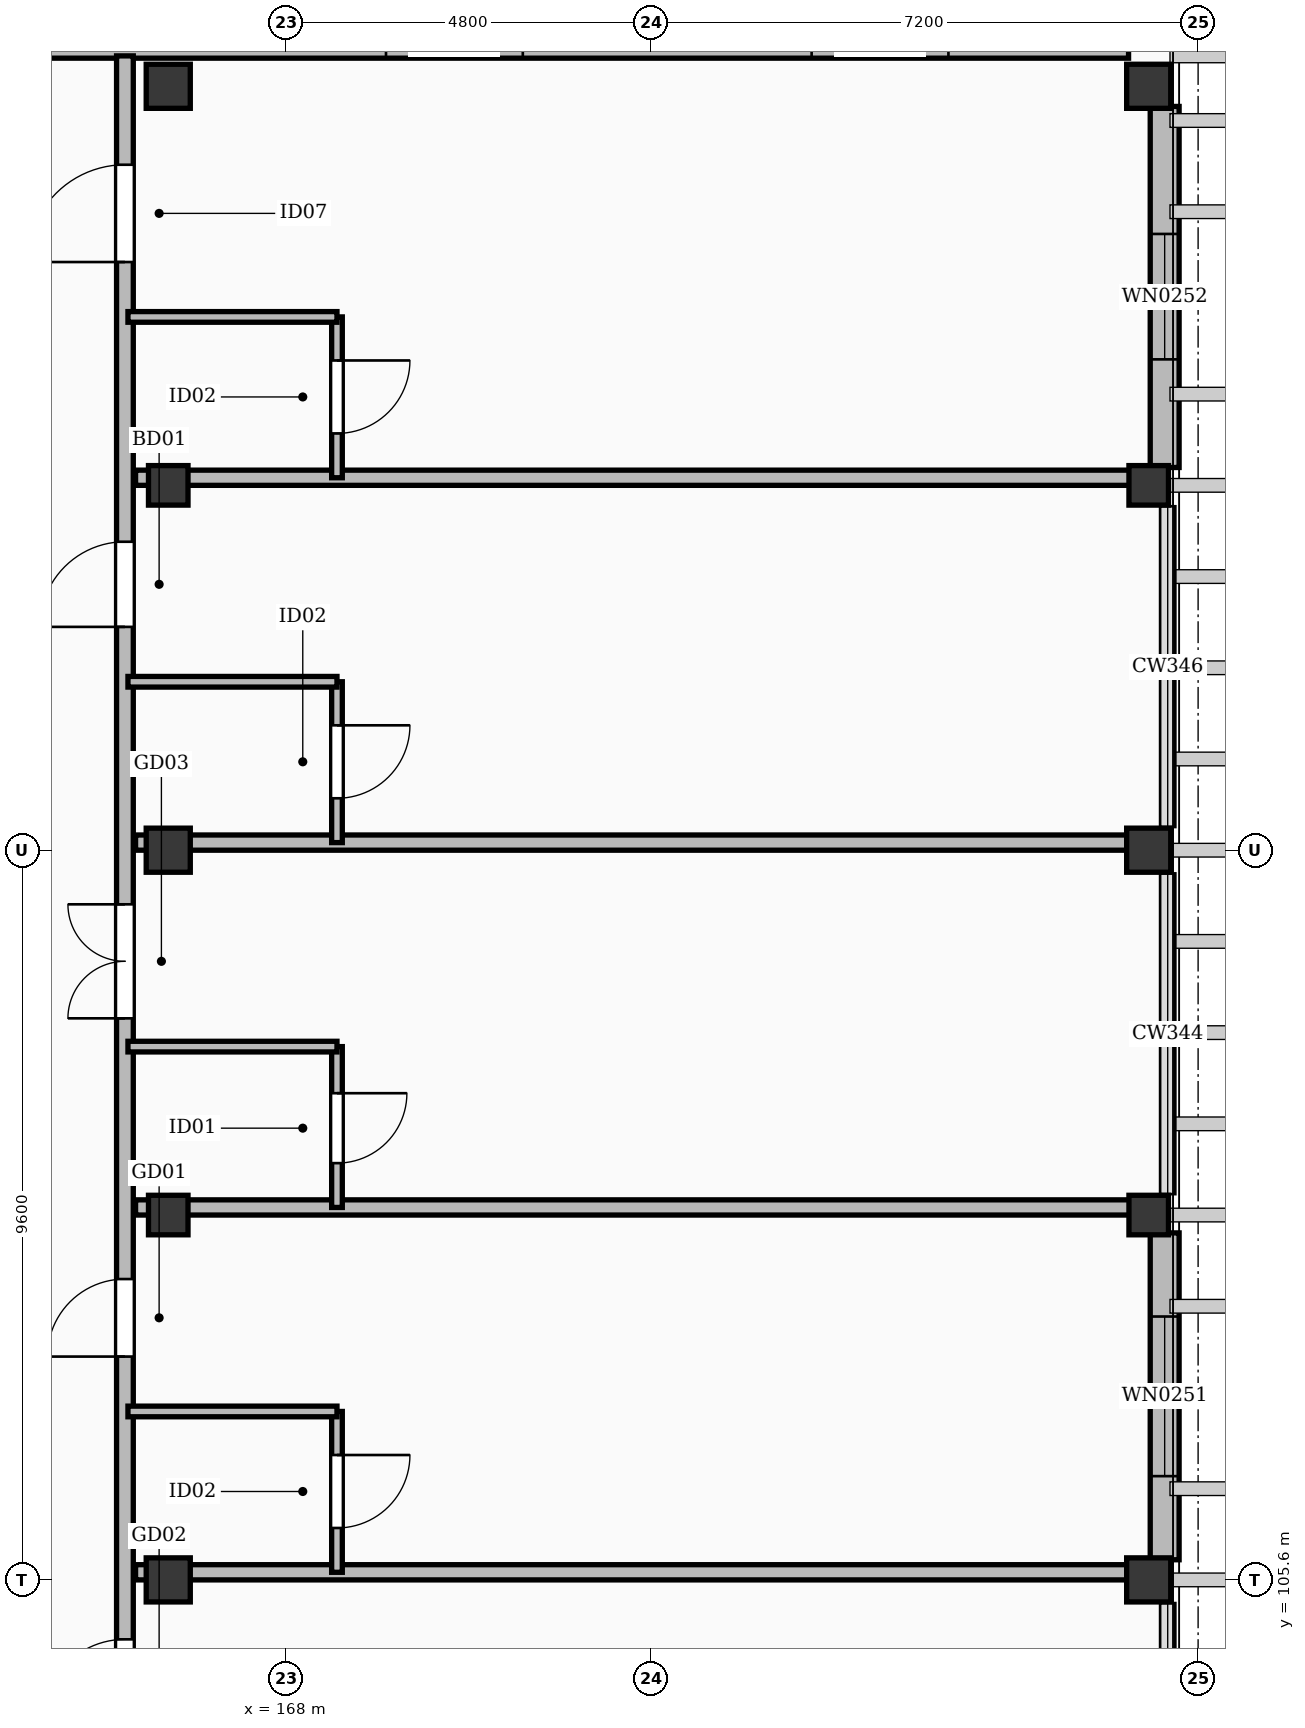
"""IFC4 building model, lengths in metres.
Left out: names, types, materials, properties, quantities, classifications, styles, units other than length and angle.
Written with IfcOpenShell. Run it as: python <this file> out.ifc"""

import sys

from ifc_helpers import new_model, si_unit, direction, frame, frame_2d, origin, origin_2d, place, context, subcontext, project, spatial, rectangle, extrude, element, fill, save


model = new_model("IFC4")
c1 = context("Model", 3, precision=1e-05, world=origin(), true_north=direction((0.0, 1.0)))
c2 = subcontext(c1, "Body", "Model", "MODEL_VIEW")
j1 = project(units=[si_unit("LENGTHUNIT", "METRE"), si_unit("PLANEANGLEUNIT", "RADIAN")], contexts=[c1])
p1 = place(None, origin())
s1 = spatial("IfcSite", under=j1, at=p1, CompositionType="ELEMENT")
p2 = place(p1, origin())
s2 = spatial("IfcBuilding", under=s1, at=p2, CompositionType="ELEMENT")
p3 = place(p2, frame((0.0, 0.0, 46.5)))
s3 = spatial("IfcBuildingStorey", under=s2, at=p3, CompositionType="ELEMENT", Elevation=46.5)
for number, where, z_axis, x_axis in (
    (1, (166.45, 105.6, 0.0), (0.0, 0.0, 1.0), (1.0, 0.0, 0.0)),
    (2, (166.45, 115.2, 0.0), (0.0, 0.0, 1.0), (1.0, 0.0, 0.0)),
    (3, (166.45, 125.25, 0.0), (0.0, 0.0, 1.0), (1.0, 0.0, 0.0)),
    (4, (179.35, 105.6, 0.0), (0.0, 0.0, 1.0), (1.0, 0.0, 0.0)),
    (5, (179.35, 115.2, 0.0), (0.0, 0.0, 1.0), (1.0, 0.0, 0.0)),
    (6, (179.35, 125.25, 0.0), (0.0, 0.0, 1.0), (1.0, 0.0, 0.0)),
):
    element("IfcColumn", number, at=place(p3, frame(where, z_axis=z_axis, x_axis=x_axis)), inside=s3, PredefinedType="COLUMN", context=c2, shape_type="SweptSolid", body=[
        extrude(rectangle(XDim=0.58, YDim=0.58, at=origin_2d()), origin(), (0.0, 0.0, 1.0), 3.9),
    ])
for number, where, z_axis, x_axis in (
    (7, (166.45, 110.4, 0.0), (0.0, 0.0, 1.0), (1.0, 0.0, 0.0)),
    (8, (166.45, 120.0, 0.0), (0.0, 0.0, 1.0), (1.0, 0.0, 0.0)),
    (9, (179.35, 110.4, 0.0), (0.0, 0.0, 1.0), (1.0, 0.0, 0.0)),
    (10, (179.35, 120.0, 0.0), (0.0, 0.0, 1.0), (1.0, 0.0, 0.0)),
):
    element("IfcColumn", number, at=place(p3, frame(where, z_axis=z_axis, x_axis=x_axis)), inside=s3, PredefinedType="COLUMN", context=c2, shape_type="SweptSolid", body=[
        extrude(rectangle(XDim=0.52, YDim=0.52, at=origin_2d()), origin(), (0.0, 0.0, 1.0), 3.9),
    ])
p4 = place(p3, frame((149.715, 125.81, 0.0), z_axis=(0.0, 0.0, 1.0), x_axis=(1.0, 0.0, 0.0)))
e11 = element("IfcWall", 11, at=p4, inside=s3, PredefinedType="SOLIDWALL", context=c2, shape_type="SweptSolid", body=[
    extrude(rectangle(XDim=29.37, YDim=0.38, at=frame_2d((14.685, 0.0))), origin(), (0.0, 0.0, 1.0), 3.68),
])
p5 = place(p4, frame((3.6, 0.0, 0.55)))
e12 = element("IfcOpeningElement", 12, at=p5, cuts=e11, PredefinedType="OPENING", context=c2, shape_type="SweptSolid", body=[
    extrude(rectangle(XDim=1.8, YDim=1.76, at=frame_2d((0.9, 0.88))), frame((0.0, 0.202, 0.0), z_axis=(0.0, -1.0, 0.0), x_axis=(1.0, 0.0, 0.0)), (0.0, 0.0, 1.0), 0.404),
])
p6 = place(p4, frame((9.2, 0.0, 0.55)))
e13 = element("IfcOpeningElement", 13, at=p6, cuts=e11, PredefinedType="OPENING", context=c2, shape_type="SweptSolid", body=[
    extrude(rectangle(XDim=1.8, YDim=1.76, at=frame_2d((0.9, 0.88))), frame((0.0, 0.202, 0.0), z_axis=(0.0, -1.0, 0.0), x_axis=(1.0, 0.0, 0.0)), (0.0, 0.0, 1.0), 0.404),
])
p7 = place(p4, frame((19.6, 0.0, 0.55)))
e14 = element("IfcOpeningElement", 14, at=p7, cuts=e11, PredefinedType="OPENING", context=c2, shape_type="SweptSolid", body=[
    extrude(rectangle(XDim=1.8, YDim=1.76, at=frame_2d((0.9, 0.88))), frame((0.0, 0.202, 0.0), z_axis=(0.0, -1.0, 0.0), x_axis=(1.0, 0.0, 0.0)), (0.0, 0.0, 1.0), 0.404),
])
p8 = place(p4, frame((25.2, 0.0, 0.55)))
e15 = element("IfcOpeningElement", 15, at=p8, cuts=e11, PredefinedType="OPENING", context=c2, shape_type="SweptSolid", body=[
    extrude(rectangle(XDim=1.8, YDim=1.76, at=frame_2d((0.9, 0.88))), frame((0.0, 0.202, 0.0), z_axis=(0.0, -1.0, 0.0), x_axis=(1.0, 0.0, 0.0)), (0.0, 0.0, 1.0), 0.404),
])
p9 = place(p3, frame((179.56, 110.165, 0.0), z_axis=(0.0, 0.0, 1.0), x_axis=(0.0, -1.0, 0.0)))
e16 = element("IfcWall", 16, at=p9, inside=s3, PredefinedType="SOLIDWALL", context=c2, shape_type="SweptSolid", body=[
    extrude(rectangle(XDim=4.3, YDim=0.38, at=frame_2d((2.15, 0.0))), origin(), (0.0, 0.0, 1.0), 3.072),
])
p10 = place(p9, frame((1.1, 0.0, 0.55)))
e17 = element("IfcOpeningElement", 17, at=p10, cuts=e16, PredefinedType="OPENING", context=c2, shape_type="SweptSolid", body=[
    extrude(rectangle(XDim=2.1, YDim=1.78, at=frame_2d((1.05, 0.89))), frame((0.0, 0.202, 0.0), z_axis=(0.0, -1.0, 0.0), x_axis=(1.0, 0.0, 0.0)), (0.0, 0.0, 1.0), 0.404),
])
p11 = place(p3, frame((179.56, 124.985, 0.0), z_axis=(0.0, 0.0, 1.0), x_axis=(0.0, -1.0, 0.0)))
e18 = element("IfcWall", 18, at=p11, inside=s3, PredefinedType="SOLIDWALL", context=c2, shape_type="SweptSolid", body=[
    extrude(rectangle(XDim=4.75, YDim=0.38, at=frame_2d((2.375, 0.0))), origin(), (0.0, 0.0, 1.0), 2.922),
])
p12 = place(p11, frame((1.677, 0.0, 0.55)))
e19 = element("IfcOpeningElement", 19, at=p12, cuts=e18, PredefinedType="OPENING", context=c2, shape_type="SweptSolid", body=[
    extrude(rectangle(XDim=1.65, YDim=1.75, at=frame_2d((0.825, 0.875))), frame((0.0, 0.202, 0.0), z_axis=(0.0, -1.0, 0.0), x_axis=(1.0, 0.0, 0.0)), (0.0, 0.0, 1.0), 0.404),
])
p13 = place(p3, frame((165.88, 67.55, 0.0), z_axis=(0.0, 0.0, 1.0), x_axis=(0.0, 1.0, 0.0)))
e20 = element("IfcWall", 20, at=p13, inside=s3, PredefinedType="PARTITIONING", context=c2, shape_type="SweptSolid", body=[
    extrude(rectangle(XDim=58.1, YDim=0.22, at=frame_2d((29.05, 0.0))), origin(), (0.0, 0.0, 1.0), 2.922),
])
p14 = place(p13, frame((5.15, 0.0, 0.0)))
e21 = element("IfcOpeningElement", 21, at=p14, cuts=e20, PredefinedType="OPENING", context=c2, shape_type="SweptSolid", body=[
    extrude(rectangle(XDim=1.28, YDim=2.16, at=frame_2d((0.64, 1.08))), frame((0.0, 0.122, 0.0), z_axis=(0.0, -1.0, 0.0), x_axis=(1.0, 0.0, 0.0)), (0.0, 0.0, 1.0), 0.244),
])
p15 = place(p13, frame((12.188, 0.0, 0.0)))
e22 = element("IfcOpeningElement", 22, at=p15, cuts=e20, PredefinedType="OPENING", context=c2, shape_type="SweptSolid", body=[
    extrude(rectangle(XDim=1.02, YDim=2.2, at=frame_2d((0.51, 1.1))), frame((0.0, 0.122, 0.0), z_axis=(0.0, -1.0, 0.0), x_axis=(1.0, 0.0, 0.0)), (0.0, 0.0, 1.0), 0.244),
])
p16 = place(p13, frame((16.638, 0.0, 0.0)))
e23 = element("IfcOpeningElement", 23, at=p16, cuts=e20, PredefinedType="OPENING", context=c2, shape_type="SweptSolid", body=[
    extrude(rectangle(XDim=1.5, YDim=2.3, at=frame_2d((0.75, 1.15))), frame((0.0, 0.122, 0.0), z_axis=(0.0, -1.0, 0.0), x_axis=(1.0, 0.0, 0.0)), (0.0, 0.0, 1.0), 0.244),
])
p17 = place(p13, frame((21.788, 0.0, 0.0)))
e24 = element("IfcOpeningElement", 24, at=p17, cuts=e20, PredefinedType="OPENING", context=c2, shape_type="SweptSolid", body=[
    extrude(rectangle(XDim=1.12, YDim=2.15, at=frame_2d((0.56, 1.075))), frame((0.0, 0.122, 0.0), z_axis=(0.0, -1.0, 0.0), x_axis=(1.0, 0.0, 0.0)), (0.0, 0.0, 1.0), 0.244),
])
p18 = place(p13, frame((26.588, 0.0, 0.0)))
e25 = element("IfcOpeningElement", 25, at=p18, cuts=e20, PredefinedType="OPENING", context=c2, shape_type="SweptSolid", body=[
    extrude(rectangle(XDim=1.28, YDim=2.16, at=frame_2d((0.64, 1.08))), frame((0.0, 0.122, 0.0), z_axis=(0.0, -1.0, 0.0), x_axis=(1.0, 0.0, 0.0)), (0.0, 0.0, 1.0), 0.244),
])
p19 = place(p13, frame((31.388, 0.0, 0.0)))
e26 = element("IfcOpeningElement", 26, at=p19, cuts=e20, PredefinedType="OPENING", context=c2, shape_type="SweptSolid", body=[
    extrude(rectangle(XDim=1.05, YDim=2.18, at=frame_2d((0.525, 1.09))), frame((0.0, 0.122, 0.0), z_axis=(0.0, -1.0, 0.0), x_axis=(1.0, 0.0, 0.0)), (0.0, 0.0, 1.0), 0.244),
])
p20 = place(p13, frame((36.188, 0.0, 0.0)))
e27 = element("IfcOpeningElement", 27, at=p20, cuts=e20, PredefinedType="OPENING", context=c2, shape_type="SweptSolid", body=[
    extrude(rectangle(XDim=1.08, YDim=2.25, at=frame_2d((0.54, 1.125))), frame((0.0, 0.122, 0.0), z_axis=(0.0, -1.0, 0.0), x_axis=(1.0, 0.0, 0.0)), (0.0, 0.0, 1.0), 0.244),
])
p21 = place(p13, frame((40.988, 0.0, 0.0)))
e28 = element("IfcOpeningElement", 28, at=p21, cuts=e20, PredefinedType="OPENING", context=c2, shape_type="SweptSolid", body=[
    extrude(rectangle(XDim=1.02, YDim=2.2, at=frame_2d((0.51, 1.1))), frame((0.0, 0.122, 0.0), z_axis=(0.0, -1.0, 0.0), x_axis=(1.0, 0.0, 0.0)), (0.0, 0.0, 1.0), 0.244),
])
p22 = place(p13, frame((45.438, 0.0, 0.0)))
e29 = element("IfcOpeningElement", 29, at=p22, cuts=e20, PredefinedType="OPENING", context=c2, shape_type="SweptSolid", body=[
    extrude(rectangle(XDim=1.5, YDim=2.3, at=frame_2d((0.75, 1.15))), frame((0.0, 0.122, 0.0), z_axis=(0.0, -1.0, 0.0), x_axis=(1.0, 0.0, 0.0)), (0.0, 0.0, 1.0), 0.244),
])
p23 = place(p13, frame((50.588, 0.0, 0.0)))
e30 = element("IfcOpeningElement", 30, at=p23, cuts=e20, PredefinedType="OPENING", context=c2, shape_type="SweptSolid", body=[
    extrude(rectangle(XDim=1.12, YDim=2.15, at=frame_2d((0.56, 1.075))), frame((0.0, 0.122, 0.0), z_axis=(0.0, -1.0, 0.0), x_axis=(1.0, 0.0, 0.0)), (0.0, 0.0, 1.0), 0.244),
])
p24 = place(p13, frame((55.388, 0.0, 0.0)))
e31 = element("IfcOpeningElement", 31, at=p24, cuts=e20, PredefinedType="OPENING", context=c2, shape_type="SweptSolid", body=[
    extrude(rectangle(XDim=1.28, YDim=2.16, at=frame_2d((0.64, 1.08))), frame((0.0, 0.122, 0.0), z_axis=(0.0, -1.0, 0.0), x_axis=(1.0, 0.0, 0.0)), (0.0, 0.0, 1.0), 0.244),
])
p25 = place(p3, frame((166.02, 105.7, 0.0), z_axis=(0.0, 0.0, 1.0), x_axis=(1.0, 0.0, 0.0)))
e32 = element("IfcWall", 32, at=p25, inside=s3, PredefinedType="PARTITIONING", context=c2, shape_type="SweptSolid", body=[
    extrude(rectangle(XDim=13.23, YDim=0.2, at=frame_2d((6.615, 0.0))), origin(), (0.0, 0.0, 1.0), 3.072),
])
p26 = place(p3, frame((168.67, 105.7, 0.0), z_axis=(0.0, 0.0, 1.0), x_axis=(0.0, 1.0, 0.0)))
e33 = element("IfcWall", 33, at=p26, inside=s3, PredefinedType="PARTITIONING", context=c2, shape_type="SweptSolid", body=[
    extrude(rectangle(XDim=2.116, YDim=0.14, at=frame_2d((1.058, 0.0))), origin(), (0.0, 0.0, 1.0), 3.072),
])
p27 = place(p26, frame((0.583, 0.0, 0.0)))
e34 = element("IfcOpeningElement", 34, at=p27, cuts=e33, PredefinedType="OPENING", context=c2, shape_type="SweptSolid", body=[
    extrude(rectangle(XDim=0.96, YDim=2.12, at=frame_2d((0.48, 1.06))), frame((0.0, 0.082, 0.0), z_axis=(0.0, -1.0, 0.0), x_axis=(1.0, 0.0, 0.0)), (0.0, 0.0, 1.0), 0.164),
])
p28 = place(p3, frame((165.92, 107.816, 0.0), z_axis=(0.0, 0.0, 1.0), x_axis=(1.0, 0.0, 0.0)))
e35 = element("IfcWall", 35, at=p28, inside=s3, PredefinedType="PARTITIONING", context=c2, shape_type="SweptSolid", body=[
    extrude(rectangle(XDim=2.75, YDim=0.14, at=frame_2d((1.375, 0.0))), origin(), (0.0, 0.0, 1.0), 3.072),
])
p29 = place(p3, frame((166.02, 110.5, 0.0), z_axis=(0.0, 0.0, 1.0), x_axis=(1.0, 0.0, 0.0)))
e36 = element("IfcWall", 36, at=p29, inside=s3, PredefinedType="PARTITIONING", context=c2, shape_type="SweptSolid", body=[
    extrude(rectangle(XDim=13.23, YDim=0.2, at=frame_2d((6.615, 0.0))), origin(), (0.0, 0.0, 1.0), 3.072),
])
p30 = place(p3, frame((168.67, 110.5, 0.0), z_axis=(0.0, 0.0, 1.0), x_axis=(0.0, 1.0, 0.0)))
e37 = element("IfcWall", 37, at=p30, inside=s3, PredefinedType="PARTITIONING", context=c2, shape_type="SweptSolid", body=[
    extrude(rectangle(XDim=2.116, YDim=0.14, at=frame_2d((1.058, 0.0))), origin(), (0.0, 0.0, 1.0), 3.072),
])
p31 = place(p30, frame((0.583, 0.0, 0.0)))
e38 = element("IfcOpeningElement", 38, at=p31, cuts=e37, PredefinedType="OPENING", context=c2, shape_type="SweptSolid", body=[
    extrude(rectangle(XDim=0.92, YDim=2.1, at=frame_2d((0.46, 1.05))), frame((0.0, 0.082, 0.0), z_axis=(0.0, -1.0, 0.0), x_axis=(1.0, 0.0, 0.0)), (0.0, 0.0, 1.0), 0.164),
])
p32 = place(p3, frame((165.92, 112.616, 0.0), z_axis=(0.0, 0.0, 1.0), x_axis=(1.0, 0.0, 0.0)))
e39 = element("IfcWall", 39, at=p32, inside=s3, PredefinedType="PARTITIONING", context=c2, shape_type="SweptSolid", body=[
    extrude(rectangle(XDim=2.75, YDim=0.14, at=frame_2d((1.375, 0.0))), origin(), (0.0, 0.0, 1.0), 3.072),
])
p33 = place(p3, frame((166.02, 115.3, 0.0), z_axis=(0.0, 0.0, 1.0), x_axis=(1.0, 0.0, 0.0)))
e40 = element("IfcWall", 40, at=p33, inside=s3, PredefinedType="PARTITIONING", context=c2, shape_type="SweptSolid", body=[
    extrude(rectangle(XDim=13.23, YDim=0.2, at=frame_2d((6.615, 0.0))), origin(), (0.0, 0.0, 1.0), 3.072),
])
p34 = place(p3, frame((168.67, 115.3, 0.0), z_axis=(0.0, 0.0, 1.0), x_axis=(0.0, 1.0, 0.0)))
e41 = element("IfcWall", 41, at=p34, inside=s3, PredefinedType="PARTITIONING", context=c2, shape_type="SweptSolid", body=[
    extrude(rectangle(XDim=2.116, YDim=0.14, at=frame_2d((1.058, 0.0))), origin(), (0.0, 0.0, 1.0), 3.072),
])
p35 = place(p34, frame((0.583, 0.0, 0.0)))
e42 = element("IfcOpeningElement", 42, at=p35, cuts=e41, PredefinedType="OPENING", context=c2, shape_type="SweptSolid", body=[
    extrude(rectangle(XDim=0.96, YDim=2.12, at=frame_2d((0.48, 1.06))), frame((0.0, 0.082, 0.0), z_axis=(0.0, -1.0, 0.0), x_axis=(1.0, 0.0, 0.0)), (0.0, 0.0, 1.0), 0.164),
])
p36 = place(p3, frame((165.92, 117.416, 0.0), z_axis=(0.0, 0.0, 1.0), x_axis=(1.0, 0.0, 0.0)))
e43 = element("IfcWall", 43, at=p36, inside=s3, PredefinedType="PARTITIONING", context=c2, shape_type="SweptSolid", body=[
    extrude(rectangle(XDim=2.75, YDim=0.14, at=frame_2d((1.375, 0.0))), origin(), (0.0, 0.0, 1.0), 3.072),
])
p37 = place(p3, frame((166.02, 120.1, 0.0), z_axis=(0.0, 0.0, 1.0), x_axis=(1.0, 0.0, 0.0)))
e44 = element("IfcWall", 44, at=p37, inside=s3, PredefinedType="PARTITIONING", context=c2, shape_type="SweptSolid", body=[
    extrude(rectangle(XDim=13.23, YDim=0.2, at=frame_2d((6.615, 0.0))), origin(), (0.0, 0.0, 1.0), 3.072),
])
p38 = place(p3, frame((168.67, 120.1, 0.0), z_axis=(0.0, 0.0, 1.0), x_axis=(0.0, 1.0, 0.0)))
e45 = element("IfcWall", 45, at=p38, inside=s3, PredefinedType="PARTITIONING", context=c2, shape_type="SweptSolid", body=[
    extrude(rectangle(XDim=2.116, YDim=0.14, at=frame_2d((1.058, 0.0))), origin(), (0.0, 0.0, 1.0), 3.072),
])
p39 = place(p38, frame((0.583, 0.0, 0.0)))
e46 = element("IfcOpeningElement", 46, at=p39, cuts=e45, PredefinedType="OPENING", context=c2, shape_type="SweptSolid", body=[
    extrude(rectangle(XDim=0.96, YDim=2.12, at=frame_2d((0.48, 1.06))), frame((0.0, 0.082, 0.0), z_axis=(0.0, -1.0, 0.0), x_axis=(1.0, 0.0, 0.0)), (0.0, 0.0, 1.0), 0.164),
])
p40 = place(p3, frame((165.92, 122.216, 0.0), z_axis=(0.0, 0.0, 1.0), x_axis=(1.0, 0.0, 0.0)))
e47 = element("IfcWall", 47, at=p40, inside=s3, PredefinedType="PARTITIONING", context=c2, shape_type="SweptSolid", body=[
    extrude(rectangle(XDim=2.75, YDim=0.14, at=frame_2d((1.375, 0.0))), origin(), (0.0, 0.0, 1.0), 3.072),
])
p41 = place(p10, origin())
e48 = element("IfcWindow", 48, at=p41, inside=s3, PartitioningType="SINGLE_PANEL", PredefinedType="WINDOW", context=c2, shape_type="SweptSolid", body=[
    extrude(rectangle(XDim=2.1, YDim=1.78, at=frame_2d((1.05, 0.89))), frame((0.0, 0.03, 0.0), z_axis=(0.0, -1.0, 0.0), x_axis=(1.0, 0.0, 0.0)), (0.0, 0.0, 1.0), 0.06),
])
fill(e17, e48)
p42 = place(p12, origin())
e49 = element("IfcWindow", 49, at=p42, inside=s3, PartitioningType="SINGLE_PANEL", PredefinedType="WINDOW", context=c2, shape_type="SweptSolid", body=[
    extrude(rectangle(XDim=1.65, YDim=1.75, at=frame_2d((0.825, 0.875))), frame((0.0, 0.03, 0.0), z_axis=(0.0, -1.0, 0.0), x_axis=(1.0, 0.0, 0.0)), (0.0, 0.0, 1.0), 0.06),
])
fill(e19, e49)
p43 = place(p20, origin())
e50 = element("IfcDoor", 50, at=p43, inside=s3, OperationType="SINGLE_SWING_LEFT", PredefinedType="DOOR", context=c2, shape_type="SweptSolid", body=[
    extrude(rectangle(XDim=1.08, YDim=2.25, at=frame_2d((0.54, 1.125))), frame((0.0, 0.025, 0.0), z_axis=(0.0, -1.0, 0.0), x_axis=(1.0, 0.0, 0.0)), (0.0, 0.0, 1.0), 0.05),
])
fill(e27, e50)
p44 = place(p21, origin())
e51 = element("IfcDoor", 51, at=p44, inside=s3, OperationType="SINGLE_SWING_LEFT", PredefinedType="DOOR", context=c2, shape_type="SweptSolid", body=[
    extrude(rectangle(XDim=1.02, YDim=2.2, at=frame_2d((0.51, 1.1))), frame((0.0, 0.025, 0.0), z_axis=(0.0, -1.0, 0.0), x_axis=(1.0, 0.0, 0.0)), (0.0, 0.0, 1.0), 0.05),
])
fill(e28, e51)
p45 = place(p27, frame((0.96, 0.0, 0.0), z_axis=(0.0, 0.0, 1.0), x_axis=(-1.0, 0.0, 0.0)))
e52 = element("IfcDoor", 52, at=p45, inside=s3, OperationType="SINGLE_SWING_RIGHT", PredefinedType="DOOR", context=c2, shape_type="SweptSolid", body=[
    extrude(rectangle(XDim=0.96, YDim=2.12, at=frame_2d((0.48, 1.06))), frame((0.0, 0.025, 0.0), z_axis=(0.0, -1.0, 0.0), x_axis=(1.0, 0.0, 0.0)), (0.0, 0.0, 1.0), 0.05),
])
fill(e34, e52)
p46 = place(p22, origin())
e53 = element("IfcDoor", 53, at=p46, inside=s3, OperationType="DOUBLE_DOOR_SINGLE_SWING", PredefinedType="DOOR", context=c2, shape_type="SweptSolid", body=[
    extrude(rectangle(XDim=1.5, YDim=2.3, at=frame_2d((0.75, 1.15))), frame((0.0, 0.025, 0.0), z_axis=(0.0, -1.0, 0.0), x_axis=(1.0, 0.0, 0.0)), (0.0, 0.0, 1.0), 0.05),
])
fill(e29, e53)
p47 = place(p31, frame((0.92, 0.0, 0.0), z_axis=(0.0, 0.0, 1.0), x_axis=(-1.0, 0.0, 0.0)))
e54 = element("IfcDoor", 54, at=p47, inside=s3, OperationType="SINGLE_SWING_RIGHT", PredefinedType="DOOR", context=c2, shape_type="SweptSolid", body=[
    extrude(rectangle(XDim=0.92, YDim=2.1, at=frame_2d((0.46, 1.05))), frame((0.0, 0.025, 0.0), z_axis=(0.0, -1.0, 0.0), x_axis=(1.0, 0.0, 0.0)), (0.0, 0.0, 1.0), 0.05),
])
fill(e38, e54)
p48 = place(p23, origin())
e55 = element("IfcDoor", 55, at=p48, inside=s3, OperationType="SINGLE_SWING_LEFT", PredefinedType="DOOR", context=c2, shape_type="SweptSolid", body=[
    extrude(rectangle(XDim=1.12, YDim=2.15, at=frame_2d((0.56, 1.075))), frame((0.0, 0.025, 0.0), z_axis=(0.0, -1.0, 0.0), x_axis=(1.0, 0.0, 0.0)), (0.0, 0.0, 1.0), 0.05),
])
fill(e30, e55)
p49 = place(p35, frame((0.96, 0.0, 0.0), z_axis=(0.0, 0.0, 1.0), x_axis=(-1.0, 0.0, 0.0)))
e56 = element("IfcDoor", 56, at=p49, inside=s3, OperationType="SINGLE_SWING_RIGHT", PredefinedType="DOOR", context=c2, shape_type="SweptSolid", body=[
    extrude(rectangle(XDim=0.96, YDim=2.12, at=frame_2d((0.48, 1.06))), frame((0.0, 0.025, 0.0), z_axis=(0.0, -1.0, 0.0), x_axis=(1.0, 0.0, 0.0)), (0.0, 0.0, 1.0), 0.05),
])
fill(e42, e56)
p50 = place(p24, origin())
e57 = element("IfcDoor", 57, at=p50, inside=s3, OperationType="SINGLE_SWING_LEFT", PredefinedType="DOOR", context=c2, shape_type="SweptSolid", body=[
    extrude(rectangle(XDim=1.28, YDim=2.16, at=frame_2d((0.64, 1.08))), frame((0.0, 0.025, 0.0), z_axis=(0.0, -1.0, 0.0), x_axis=(1.0, 0.0, 0.0)), (0.0, 0.0, 1.0), 0.05),
])
fill(e31, e57)
p51 = place(p39, frame((0.96, 0.0, 0.0), z_axis=(0.0, 0.0, 1.0), x_axis=(-1.0, 0.0, 0.0)))
e58 = element("IfcDoor", 58, at=p51, inside=s3, OperationType="SINGLE_SWING_RIGHT", PredefinedType="DOOR", context=c2, shape_type="SweptSolid", body=[
    extrude(rectangle(XDim=0.96, YDim=2.12, at=frame_2d((0.48, 1.06))), frame((0.0, 0.025, 0.0), z_axis=(0.0, -1.0, 0.0), x_axis=(1.0, 0.0, 0.0)), (0.0, 0.0, 1.0), 0.05),
])
fill(e46, e58)
save(model, sys.argv[1])
